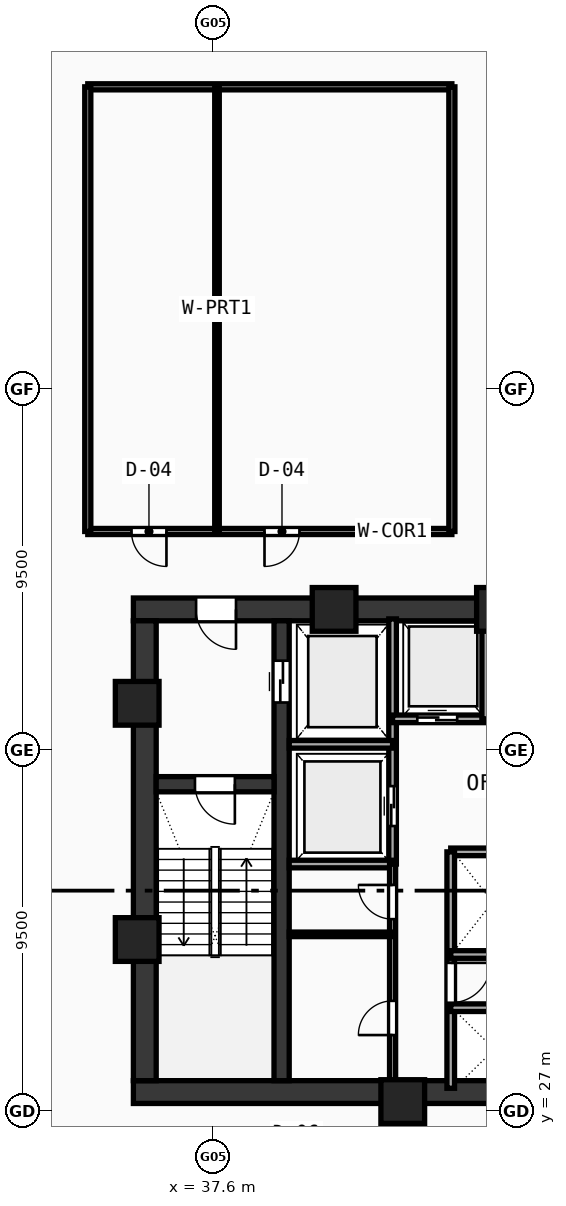
"""IFC4 building model, lengths in metres.
Left out: names, types, materials, properties, quantities, classifications, styles, units other than length and angle.
Written with IfcOpenShell. Run it as: python <this file> out.ifc"""

import sys

from ifc_helpers import new_model, si_unit, direction, frame, frame_2d, origin, origin_with_axes, origin_2d, place, context, subcontext, project, spatial, rectangle, hollow_rectangle, extrude, source, transform, mapped, element, fill, save


model = new_model("IFC4")
c1 = context("Model", 3, precision=1e-05, world=origin(), true_north=direction((0.0, 1.0)))
c2 = subcontext(c1, "Body", "Model", "MODEL_VIEW")
j1 = project(units=[si_unit("LENGTHUNIT", "METRE"), si_unit("PLANEANGLEUNIT", "RADIAN")], contexts=[c1])
p1 = place(None, origin())
s1 = spatial("IfcSite", under=j1, at=p1, CompositionType="ELEMENT")
p2 = place(p1, origin())
s2 = spatial("IfcBuilding", under=s1, at=p2, CompositionType="ELEMENT")
p3 = place(p2, frame((0.0, 0.0, 111.58)))
s3 = spatial("IfcBuildingStorey", under=s2, at=p3, CompositionType="ELEMENT", Elevation=111.58)
p4 = place(p3, frame((35.5, 27.5, 0.0), z_axis=(0.0, 0.0, 1.0), x_axis=(1.0, 0.0, 0.0)))
e1 = element("IfcWall", 1, at=p4, inside=s3, PredefinedType="SHEAR", context=c2, shape_type="SweptSolid", body=[
    extrude(rectangle(XDim=25.0, YDim=0.6, at=frame_2d((12.5, 0.0))), origin(), (0.0, 0.0, 1.0), 3.54),
])
p5 = place(p3, frame((35.5, 40.2, 0.0), z_axis=(0.0, 0.0, 1.0), x_axis=(1.0, 0.0, 0.0)))
e2 = element("IfcWall", 2, at=p5, inside=s3, PredefinedType="SHEAR", context=c2, shape_type="SweptSolid", body=[
    extrude(rectangle(XDim=11.3, YDim=0.6, at=frame_2d((5.65, 0.0))), origin(), (0.0, 0.0, 1.0), 3.54),
])
p6 = place(p5, frame((1.65, 0.0, 0.0)))
e3 = element("IfcOpeningElement", 3, at=p6, cuts=e2, PredefinedType="OPENING", context=c2, shape_type="SweptSolid", body=[
    extrude(rectangle(XDim=1.05, YDim=2.1, at=frame_2d((0.525, 1.05))), frame((0.0, 0.31, 0.0), z_axis=(0.0, -1.0, 0.0), x_axis=(1.0, 0.0, 0.0)), (0.0, 0.0, 1.0), 0.62),
])
p7 = place(p3, frame((35.8, 27.8, 0.0), z_axis=(0.0, 0.0, 1.0), x_axis=(0.0, 1.0, 0.0)))
e4 = element("IfcWall", 4, at=p7, inside=s3, PredefinedType="SHEAR", context=c2, shape_type="SweptSolid", body=[
    extrude(rectangle(XDim=12.1, YDim=0.6, at=frame_2d((6.05, 0.0))), origin(), (0.0, 0.0, 1.0), 3.54),
])
p8 = place(p3, frame((39.4, 27.8, 0.0), z_axis=(0.0, 0.0, 1.0), x_axis=(0.0, 1.0, 0.0)))
e5 = element("IfcWall", 5, at=p8, inside=s3, PredefinedType="SHEAR", context=c2, shape_type="SweptSolid", body=[
    extrude(rectangle(XDim=12.1, YDim=0.4, at=frame_2d((6.05, 0.0))), origin(), (0.0, 0.0, 1.0), 3.54),
])
p9 = place(p8, frame((9.95, 0.0, 0.0)))
e6 = element("IfcOpeningElement", 6, at=p9, cuts=e5, PredefinedType="OPENING", context=c2, shape_type="SweptSolid", body=[
    extrude(rectangle(XDim=1.1, YDim=2.1, at=frame_2d((0.55, 1.05))), frame((0.0, 0.21, 0.0), z_axis=(0.0, -1.0, 0.0), x_axis=(1.0, 0.0, 0.0)), (0.0, 0.0, 1.0), 0.42),
])
p10 = place(p3, frame((36.1, 35.6, 0.0), z_axis=(0.0, 0.0, 1.0), x_axis=(1.0, 0.0, 0.0)))
e7 = element("IfcWall", 7, at=p10, inside=s3, PredefinedType="SHEAR", context=c2, shape_type="SweptSolid", body=[
    extrude(rectangle(XDim=3.1, YDim=0.4, at=frame_2d((1.55, 0.0))), origin(), (0.0, 0.0, 1.0), 3.54),
])
p11 = place(p10, frame((1.02, 0.0, 0.0)))
e8 = element("IfcOpeningElement", 8, at=p11, cuts=e7, PredefinedType="OPENING", context=c2, shape_type="SweptSolid", body=[
    extrude(rectangle(XDim=1.05, YDim=2.1, at=frame_2d((0.525, 1.05))), frame((0.0, 0.21, 0.0), z_axis=(0.0, -1.0, 0.0), x_axis=(1.0, 0.0, 0.0)), (0.0, 0.0, 1.0), 0.42),
])
m1 = source(origin(), c2, "Body", "SweptSolid", [
    extrude(hollow_rectangle(XDim=1.15, YDim=1.15, WallThickness=0.048, at=origin_2d()), origin(), (0.0, 0.0, 1.0), 3.8),
])
for number, where, z_axis, x_axis in (
    (9, (42.588, 27.25, -0.26), (0.0, 0.0, 1.0), (1.0, 0.0, 0.0)),
    (10, (45.106, 40.2, -0.26), (0.0, 0.0, 1.0), (1.0, 0.0, 0.0)),
    (11, (40.781, 40.2, -0.26), (0.0, 0.0, 1.0), (1.0, 0.0, 0.0)),
    (12, (35.6, 37.729, -0.26), (0.0, 0.0, 1.0), (1.0, 0.0, 0.0)),
    (13, (35.6, 31.513, -0.26), (0.0, 0.0, 1.0), (1.0, 0.0, 0.0)),
):
    element("IfcColumn", number, at=place(p3, frame(where, z_axis=z_axis, x_axis=x_axis)), inside=s3, PredefinedType="COLUMN", context=c2, shape_type="MappedRepresentation", body=[
        mapped(m1, transform((0.0, 0.0, 0.0), scale=1.0)),
    ])
p12 = place(p3, frame((42.32, 33.5, 0.0), z_axis=(0.0, 0.0, 1.0), x_axis=(0.0, 1.0, 0.0)))
e14 = element("IfcWall", 14, at=p12, inside=s3, PredefinedType="SOLIDWALL", context=c2, shape_type="SweptSolid", body=[
    extrude(rectangle(XDim=6.45, YDim=0.2, at=frame_2d((3.225, 0.0))), origin(), (0.0, 0.0, 1.0), 3.54),
])
p13 = place(p12, frame((1.0, 0.0, 0.0)))
e15 = element("IfcOpeningElement", 15, at=p13, cuts=e14, PredefinedType="OPENING", context=c2, shape_type="SweptSolid", body=[
    extrude(rectangle(XDim=1.05, YDim=2.1, at=frame_2d((0.525, 1.05))), frame((0.0, 0.11, 0.0), z_axis=(0.0, -1.0, 0.0), x_axis=(1.0, 0.0, 0.0)), (0.0, 0.0, 1.0), 0.22),
])
for number, where, z_axis, x_axis in (
    (16, (39.6, 36.65, 0.0), (0.0, 0.0, 1.0), (1.0, 0.0, 0.0)),
    (17, (39.6, 33.5, 0.0), (0.0, 0.0, 1.0), (1.0, 0.0, 0.0)),
):
    element("IfcWall", number, at=place(p3, frame(where, z_axis=z_axis, x_axis=x_axis)), inside=s3, PredefinedType="SOLIDWALL", context=c2, shape_type="SweptSolid", body=[
        extrude(rectangle(XDim=2.72, YDim=0.2, at=frame_2d((1.36, 0.0))), origin(), (0.0, 0.0, 1.0), 3.54),
    ])
p14 = place(p3, frame((42.32, 37.32, 0.0), z_axis=(0.0, 0.0, 1.0), x_axis=(1.0, 0.0, 0.0)))
e18 = element("IfcWall", 18, at=p14, inside=s3, PredefinedType="SOLIDWALL", context=c2, shape_type="SweptSolid", body=[
    extrude(rectangle(XDim=4.73, YDim=0.2, at=frame_2d((2.365, 0.0))), origin(), (0.0, 0.0, 1.0), 3.54),
])
p15 = place(p14, frame((0.65, 0.0, 0.0)))
e19 = element("IfcOpeningElement", 19, at=p15, cuts=e18, PredefinedType="OPENING", context=c2, shape_type="SweptSolid", body=[
    extrude(rectangle(XDim=1.05, YDim=2.1, at=frame_2d((0.525, 1.05))), frame((0.0, 0.11, 0.0), z_axis=(0.0, -1.0, 0.0), x_axis=(1.0, 0.0, 0.0)), (0.0, 0.0, 1.0), 0.22),
])
p16 = place(p14, frame((2.95, 0.0, 0.0)))
e20 = element("IfcOpeningElement", 20, at=p16, cuts=e18, PredefinedType="OPENING", context=c2, shape_type="SweptSolid", body=[
    extrude(rectangle(XDim=1.05, YDim=2.1, at=frame_2d((0.525, 1.05))), frame((0.0, 0.11, 0.0), z_axis=(0.0, -1.0, 0.0), x_axis=(1.0, 0.0, 0.0)), (0.0, 0.0, 1.0), 0.22),
])
p17 = place(p3, frame((44.77, 37.32, 0.0), z_axis=(0.0, 0.0, 1.0), x_axis=(0.0, 1.0, 0.0)))
e21 = element("IfcWall", 21, at=p17, inside=s3, PredefinedType="SOLIDWALL", context=c2, shape_type="SweptSolid", body=[
    extrude(rectangle(XDim=2.63, YDim=0.2, at=frame_2d((1.315, 0.0))), origin(), (0.0, 0.0, 1.0), 3.54),
])
p18 = place(p3, frame((43.85, 33.82, 0.0), z_axis=(0.0, 0.0, 1.0), x_axis=(1.0, 0.0, 0.0)))
e22 = element("IfcWall", 22, at=p18, inside=s3, PredefinedType="SOLIDWALL", context=c2, shape_type="SweptSolid", body=[
    extrude(rectangle(XDim=9.83, YDim=0.2, at=frame_2d((4.915, 0.0))), origin(), (0.0, 0.0, 1.0), 3.54),
])
p19 = place(p3, frame((43.85, 27.6, 0.0), z_axis=(0.0, 0.0, 1.0), x_axis=(0.0, 1.0, 0.0)))
e23 = element("IfcWall", 23, at=p19, inside=s3, PredefinedType="SOLIDWALL", context=c2, shape_type="SweptSolid", body=[
    extrude(rectangle(XDim=6.22, YDim=0.2, at=frame_2d((3.11, 0.0))), origin(), (0.0, 0.0, 1.0), 3.54),
])
p20 = place(p19, frame((2.25, 0.0, 0.0)))
e24 = element("IfcOpeningElement", 24, at=p20, cuts=e23, PredefinedType="OPENING", context=c2, shape_type="SweptSolid", body=[
    extrude(rectangle(XDim=1.05, YDim=2.1, at=frame_2d((0.525, 1.05))), frame((0.0, 0.11, 0.0), z_axis=(0.0, -1.0, 0.0), x_axis=(1.0, 0.0, 0.0)), (0.0, 0.0, 1.0), 0.22),
])
p21 = place(p3, frame((43.85, 29.72, 0.0), z_axis=(0.0, 0.0, 1.0), x_axis=(1.0, 0.0, 0.0)))
e25 = element("IfcWall", 25, at=p21, inside=s3, PredefinedType="SOLIDWALL", context=c2, shape_type="SweptSolid", body=[
    extrude(rectangle(XDim=7.2, YDim=0.2, at=frame_2d((3.6, 0.0))), origin(), (0.0, 0.0, 1.0), 3.54),
])
p22 = place(p3, frame((43.85, 31.12, 0.0), z_axis=(0.0, 0.0, 1.0), x_axis=(1.0, 0.0, 0.0)))
e26 = element("IfcWall", 26, at=p22, inside=s3, PredefinedType="SOLIDWALL", context=c2, shape_type="SweptSolid", body=[
    extrude(rectangle(XDim=9.83, YDim=0.2, at=frame_2d((4.915, 0.0))), origin(), (0.0, 0.0, 1.0), 3.54),
])
p23 = place(p3, frame((42.32, 27.6, 0.0), z_axis=(0.0, 0.0, 1.0), x_axis=(0.0, 1.0, 0.0)))
e27 = element("IfcWall", 27, at=p23, inside=s3, PredefinedType="PARTITIONING", context=c2, shape_type="SweptSolid", body=[
    extrude(rectangle(XDim=5.9, YDim=0.16, at=frame_2d((2.95, 0.0))), origin(), (0.0, 0.0, 1.0), 3.54),
])
p24 = place(p23, frame((1.4, 0.0, 0.0)))
e28 = element("IfcOpeningElement", 28, at=p24, cuts=e27, PredefinedType="OPENING", context=c2, shape_type="SweptSolid", body=[
    extrude(rectangle(XDim=0.9, YDim=2.1, at=frame_2d((0.45, 1.05))), frame((0.0, 0.09, 0.0), z_axis=(0.0, -1.0, 0.0), x_axis=(1.0, 0.0, 0.0)), (0.0, 0.0, 1.0), 0.18),
])
p25 = place(p23, frame((4.45, 0.0, 0.0)))
e29 = element("IfcOpeningElement", 29, at=p25, cuts=e27, PredefinedType="OPENING", context=c2, shape_type="SweptSolid", body=[
    extrude(rectangle(XDim=0.9, YDim=2.1, at=frame_2d((0.45, 1.05))), frame((0.0, 0.09, 0.0), z_axis=(0.0, -1.0, 0.0), x_axis=(1.0, 0.0, 0.0)), (0.0, 0.0, 1.0), 0.18),
])
p26 = place(p3, frame((39.6, 31.65, 0.0), z_axis=(0.0, 0.0, 1.0), x_axis=(1.0, 0.0, 0.0)))
e30 = element("IfcWall", 30, at=p26, inside=s3, PredefinedType="PARTITIONING", context=c2, shape_type="SweptSolid", body=[
    extrude(rectangle(XDim=2.72, YDim=0.12, at=frame_2d((1.36, 0.0))), origin(), (0.0, 0.0, 1.0), 3.54),
])
p27 = place(p3, frame((34.3, 42.25, 0.0), z_axis=(0.0, 0.0, 1.0), x_axis=(1.0, 0.0, 0.0)))
e31 = element("IfcWall", 31, at=p27, inside=s3, PredefinedType="PARTITIONING", context=c2, shape_type="SweptSolid", body=[
    extrude(rectangle(XDim=9.58, YDim=0.16, at=frame_2d((4.79, 0.0))), origin(), (0.0, 0.0, 1.0), 2.84),
])
p28 = place(p27, frame((1.15, 0.0, 0.0)))
e32 = element("IfcOpeningElement", 32, at=p28, cuts=e31, PredefinedType="OPENING", context=c2, shape_type="SweptSolid", body=[
    extrude(rectangle(XDim=0.92, YDim=2.1, at=frame_2d((0.46, 1.05))), frame((0.0, 0.09, 0.0), z_axis=(0.0, -1.0, 0.0), x_axis=(1.0, 0.0, 0.0)), (0.0, 0.0, 1.0), 0.18),
])
p29 = place(p27, frame((4.65, 0.0, 0.0)))
e33 = element("IfcOpeningElement", 33, at=p29, cuts=e31, PredefinedType="OPENING", context=c2, shape_type="SweptSolid", body=[
    extrude(rectangle(XDim=0.92, YDim=2.1, at=frame_2d((0.46, 1.05))), frame((0.0, 0.09, 0.0), z_axis=(0.0, -1.0, 0.0), x_axis=(1.0, 0.0, 0.0)), (0.0, 0.0, 1.0), 0.18),
])
p30 = place(p3, frame((34.3, 53.95, 0.0), z_axis=(0.0, 0.0, 1.0), x_axis=(1.0, 0.0, 0.0)))
e34 = element("IfcWall", 34, at=p30, inside=s3, PredefinedType="PARTITIONING", context=c2, shape_type="SweptSolid", body=[
    extrude(rectangle(XDim=9.58, YDim=0.16, at=frame_2d((4.79, 0.0))), origin(), (0.0, 0.0, 1.0), 2.84),
])
for number, where, z_axis, x_axis in (
    (35, (34.3, 42.25, 0.0), (0.0, 0.0, 1.0), (0.0, 1.0, 0.0)),
    (36, (43.88, 42.25, 0.0), (0.0, 0.0, 1.0), (0.0, 1.0, 0.0)),
):
    element("IfcWall", number, at=place(p3, frame(where, z_axis=z_axis, x_axis=x_axis)), inside=s3, PredefinedType="PARTITIONING", context=c2, shape_type="SweptSolid", body=[
        extrude(rectangle(XDim=11.7, YDim=0.16, at=frame_2d((5.85, 0.0))), origin(), (0.0, 0.0, 1.0), 2.84),
    ])
p31 = place(p3, frame((37.7, 42.25, 0.0), z_axis=(0.0, 0.0, 1.0), x_axis=(0.0, 1.0, 0.0)))
e37 = element("IfcWall", 37, at=p31, inside=s3, PredefinedType="PARTITIONING", context=c2, shape_type="SweptSolid", body=[
    extrude(rectangle(XDim=11.7, YDim=0.12, at=frame_2d((5.85, 0.0))), origin(), (0.0, 0.0, 1.0), 2.84),
])
m2 = source(origin(), c2, "Body", "SweptSolid", [
    extrude(rectangle(XDim=1.05, YDim=2.1, at=frame_2d((0.525, 1.05))), frame((0.0, 0.025, 0.0), z_axis=(0.0, -1.0, 0.0), x_axis=(1.0, 0.0, 0.0)), (0.0, 0.0, 1.0), 0.05),
])
p32 = place(p11, frame((1.05, 0.0, 0.0), z_axis=(0.0, 0.0, 1.0), x_axis=(-1.0, 0.0, 0.0)))
e38 = element("IfcDoor", 38, at=p32, inside=s3, OperationType="SINGLE_SWING_LEFT", PredefinedType="DOOR", context=c2, shape_type="MappedRepresentation", body=[
    mapped(m2, transform((0.0, 0.0, 0.0), scale=1.0)),
])
fill(e8, e38)
p33 = place(p6, frame((1.05, 0.0, 0.0), z_axis=(0.0, 0.0, 1.0), x_axis=(-1.0, 0.0, 0.0)))
e39 = element("IfcDoor", 39, at=p33, inside=s3, OperationType="SINGLE_SWING_LEFT", PredefinedType="DOOR", context=c2, shape_type="MappedRepresentation", body=[
    mapped(m2, transform((0.0, 0.0, 0.0), scale=1.0)),
])
fill(e3, e39)
m3 = source(origin(), c2, "Body", "SweptSolid", [
    extrude(rectangle(XDim=1.1, YDim=2.1, at=frame_2d((0.55, 1.05))), frame((0.0, 0.025, 0.0), z_axis=(0.0, -1.0, 0.0), x_axis=(1.0, 0.0, 0.0)), (0.0, 0.0, 1.0), 0.05),
])
p34 = place(p9, frame((1.1, 0.0, 0.0), z_axis=(0.0, 0.0, 1.0), x_axis=(-1.0, 0.0, 0.0)))
e40 = element("IfcDoor", 40, at=p34, inside=s3, OperationType="DOUBLE_DOOR_SLIDING", PredefinedType="DOOR", context=c2, shape_type="MappedRepresentation", body=[
    mapped(m3, transform((0.0, 0.0, 0.0), scale=1.0)),
])
fill(e6, e40)
p35 = place(p13, origin_with_axes())
e41 = element("IfcDoor", 41, at=p35, inside=s3, OperationType="DOUBLE_DOOR_SLIDING", PredefinedType="DOOR", context=c2, shape_type="MappedRepresentation", body=[
    mapped(m2, transform((0.0, 0.0, 0.0), scale=1.0)),
])
fill(e15, e41)
p36 = place(p15, frame((1.05, 0.0, 0.0), z_axis=(0.0, 0.0, 1.0), x_axis=(-1.0, 0.0, 0.0)))
e42 = element("IfcDoor", 42, at=p36, inside=s3, OperationType="DOUBLE_DOOR_SLIDING", PredefinedType="DOOR", context=c2, shape_type="MappedRepresentation", body=[
    mapped(m2, transform((0.0, 0.0, 0.0), scale=1.0)),
])
fill(e19, e42)
p37 = place(p20, frame((1.05, 0.0, 0.0), z_axis=(0.0, 0.0, 1.0), x_axis=(-1.0, 0.0, 0.0)))
e43 = element("IfcDoor", 43, at=p37, inside=s3, OperationType="SINGLE_SWING_LEFT", PredefinedType="DOOR", context=c2, shape_type="MappedRepresentation", body=[
    mapped(m2, transform((0.0, 0.0, 0.0), scale=1.0)),
])
fill(e24, e43)
m4 = source(origin(), c2, "Body", "SweptSolid", [
    extrude(rectangle(XDim=0.9, YDim=2.1, at=frame_2d((0.45, 1.05))), frame((0.0, 0.025, 0.0), z_axis=(0.0, -1.0, 0.0), x_axis=(1.0, 0.0, 0.0)), (0.0, 0.0, 1.0), 0.05),
])
p38 = place(p24, origin_with_axes())
e44 = element("IfcDoor", 44, at=p38, inside=s3, OperationType="SINGLE_SWING_LEFT", PredefinedType="DOOR", context=c2, shape_type="MappedRepresentation", body=[
    mapped(m4, transform((0.0, 0.0, 0.0), scale=1.0)),
])
fill(e28, e44)
p39 = place(p25, origin_with_axes())
e45 = element("IfcDoor", 45, at=p39, inside=s3, OperationType="SINGLE_SWING_RIGHT", PredefinedType="DOOR", context=c2, shape_type="MappedRepresentation", body=[
    mapped(m4, transform((0.0, 0.0, 0.0), scale=1.0)),
])
fill(e29, e45)
m5 = source(origin(), c2, "Body", "SweptSolid", [
    extrude(rectangle(XDim=0.92, YDim=2.1, at=frame_2d((0.46, 1.05))), frame((0.0, 0.025, 0.0), z_axis=(0.0, -1.0, 0.0), x_axis=(1.0, 0.0, 0.0)), (0.0, 0.0, 1.0), 0.05),
])
p40 = place(p28, frame((0.92, 0.0, 0.0), z_axis=(0.0, 0.0, 1.0), x_axis=(-1.0, 0.0, 0.0)))
e46 = element("IfcDoor", 46, at=p40, inside=s3, OperationType="SINGLE_SWING_LEFT", PredefinedType="DOOR", context=c2, shape_type="MappedRepresentation", body=[
    mapped(m5, transform((0.0, 0.0, 0.0), scale=1.0)),
])
fill(e32, e46)
p41 = place(p29, frame((0.92, 0.0, 0.0), z_axis=(0.0, 0.0, 1.0), x_axis=(-1.0, 0.0, 0.0)))
e47 = element("IfcDoor", 47, at=p41, inside=s3, OperationType="SINGLE_SWING_RIGHT", PredefinedType="DOOR", context=c2, shape_type="MappedRepresentation", body=[
    mapped(m5, transform((0.0, 0.0, 0.0), scale=1.0)),
])
fill(e33, e47)
save(model, sys.argv[1])
